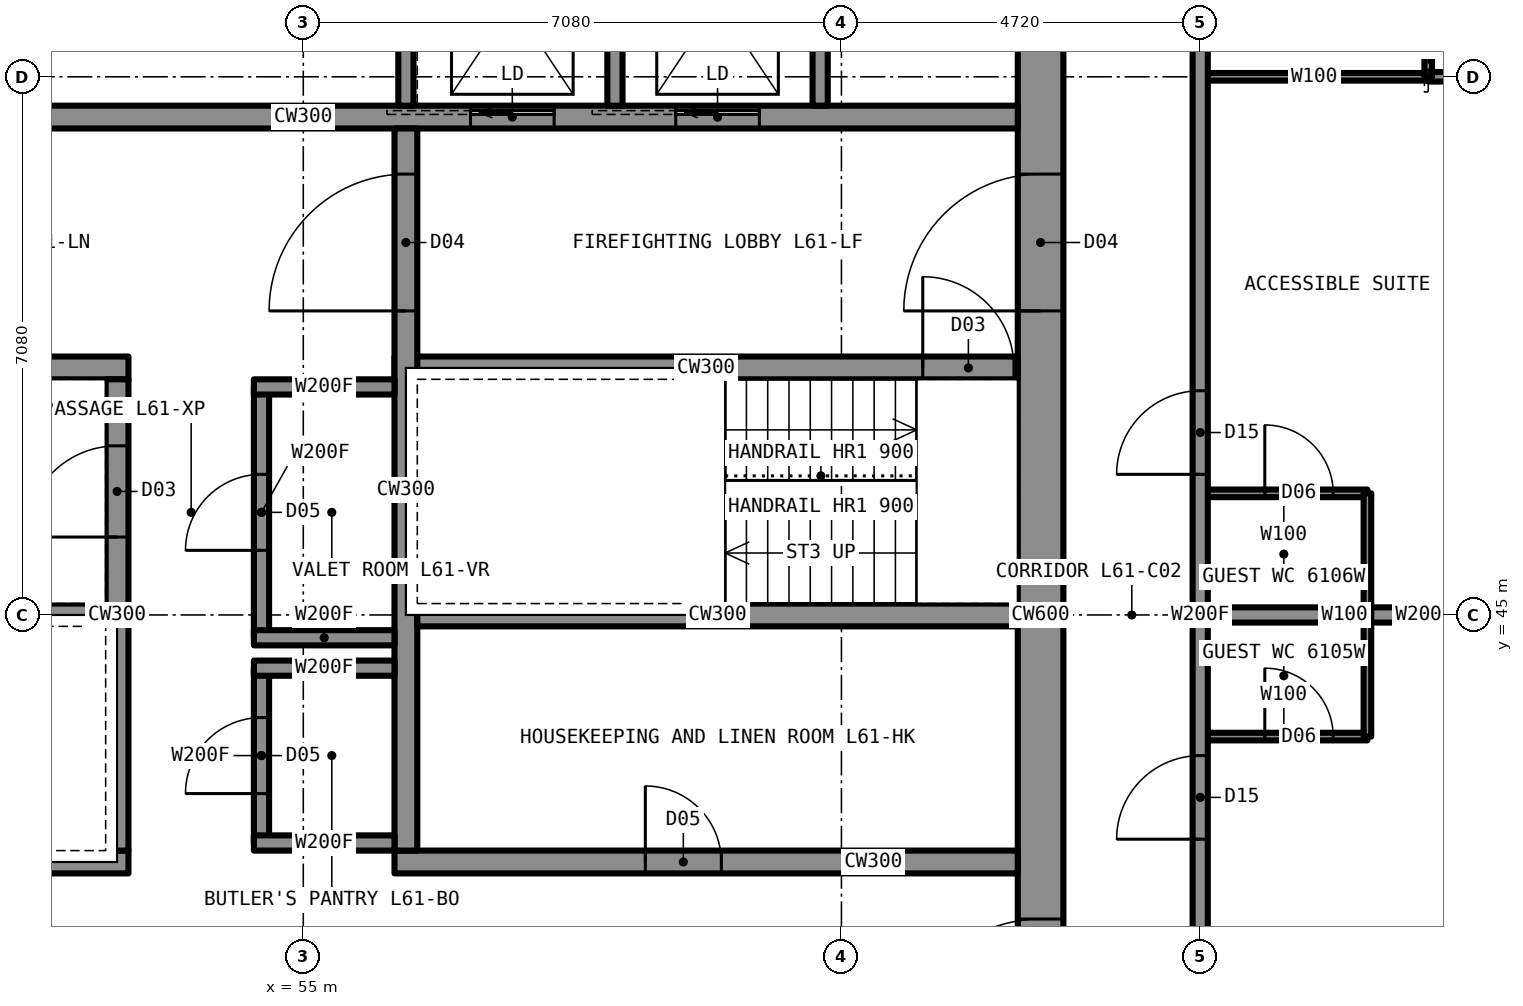
"""IFC4 building model, lengths in metres.
Left out: names, types, materials, properties, quantities, classifications, styles, units other than length and angle.
Written with IfcOpenShell. Run it as: python <this file> out.ifc"""

import sys

from ifc_helpers import new_model, si_unit, direction, frame, frame_2d, origin, place, context, subcontext, project, spatial, rectangle, extrude, element, fill, save


model = new_model("IFC4")
c1 = context("Model", 3, precision=1e-05, world=origin(), true_north=direction((0.0, 1.0)))
c2 = subcontext(c1, "Body", "Model", "MODEL_VIEW")
j1 = project(units=[si_unit("LENGTHUNIT", "METRE"), si_unit("PLANEANGLEUNIT", "RADIAN")], contexts=[c1])
p1 = place(None, origin())
s1 = spatial("IfcSite", under=j1, at=p1, CompositionType="ELEMENT")
p2 = place(p1, origin())
s2 = spatial("IfcBuilding", under=s1, at=p2, CompositionType="ELEMENT")
p3 = place(p2, frame((0.0, 0.0, 226.7)))
s3 = spatial("IfcBuildingStorey", under=s2, at=p3, CompositionType="ELEMENT", Elevation=226.7)
p4 = place(p3, frame((64.7, 35.6, 0.0), z_axis=(0.0, 0.0, 1.0), x_axis=(0.0, 1.0, 0.0)))
e1 = element("IfcWall", 1, at=p4, inside=s3, PredefinedType="SHEAR", context=c2, shape_type="SweptSolid", body=[
    extrude(rectangle(XDim=18.8, YDim=0.6, at=frame_2d((9.4, 0.0))), origin(), (0.0, 0.0, 1.0), 3.5),
])
p5 = place(p4, frame((13.4, 0.0, 0.0)))
e2 = element("IfcOpeningElement", 2, at=p5, cuts=e1, PredefinedType="OPENING", context=c2, shape_type="SweptSolid", body=[
    extrude(rectangle(XDim=1.8, YDim=2.2, at=frame_2d((0.9, 1.1))), frame((0.0, 0.31, 0.0), z_axis=(0.0, -1.0, 0.0), x_axis=(1.0, 0.0, 0.0)), (0.0, 0.0, 1.0), 0.62),
])
p6 = place(p4, frame((3.6, 0.0, 0.0)))
e3 = element("IfcOpeningElement", 3, at=p6, cuts=e1, PredefinedType="OPENING", context=c2, shape_type="SweptSolid", body=[
    extrude(rectangle(XDim=1.8, YDim=2.2, at=frame_2d((0.9, 1.1))), frame((0.0, 0.31, 0.0), z_axis=(0.0, -1.0, 0.0), x_axis=(1.0, 0.0, 0.0)), (0.0, 0.0, 1.0), 0.62),
])
p7 = place(p3, frame((45.6, 51.55, 0.0), z_axis=(0.0, 0.0, 1.0), x_axis=(1.0, 0.0, 0.0)))
e4 = element("IfcWall", 4, at=p7, inside=s3, PredefinedType="SHEAR", context=c2, shape_type="SweptSolid", body=[
    extrude(rectangle(XDim=18.8, YDim=0.3, at=frame_2d((9.4, 0.0))), origin(), (0.0, 0.0, 1.0), 3.5),
])
p8 = place(p7, frame((4.8, 0.0, 0.0)))
e5 = element("IfcOpeningElement", 5, at=p8, cuts=e4, PredefinedType="OPENING", context=c2, shape_type="SweptSolid", body=[
    extrude(rectangle(XDim=1.0, YDim=2.1, at=frame_2d((0.5, 1.05))), frame((0.0, 0.16, 0.0), z_axis=(0.0, -1.0, 0.0), x_axis=(1.0, 0.0, 0.0)), (0.0, 0.0, 1.0), 0.32),
])
p9 = place(p7, frame((11.6, 0.0, 0.0)))
e6 = element("IfcOpeningElement", 6, at=p9, cuts=e4, PredefinedType="OPENING", context=c2, shape_type="SweptSolid", body=[
    extrude(rectangle(XDim=1.1, YDim=2.2, at=frame_2d((0.55, 1.1))), frame((0.0, 0.16, 0.0), z_axis=(0.0, -1.0, 0.0), x_axis=(1.0, 0.0, 0.0)), (0.0, 0.0, 1.0), 0.32),
])
p10 = place(p7, frame((14.3, 0.0, 0.0)))
e7 = element("IfcOpeningElement", 7, at=p10, cuts=e4, PredefinedType="OPENING", context=c2, shape_type="SweptSolid", body=[
    extrude(rectangle(XDim=1.1, YDim=2.2, at=frame_2d((0.55, 1.1))), frame((0.0, 0.16, 0.0), z_axis=(0.0, -1.0, 0.0), x_axis=(1.0, 0.0, 0.0)), (0.0, 0.0, 1.0), 0.32),
])
p11 = place(p3, frame((45.6, 48.25, 0.0), z_axis=(0.0, 0.0, 1.0), x_axis=(1.0, 0.0, 0.0)))
e8 = element("IfcWall", 8, at=p11, inside=s3, PredefinedType="SHEAR", context=c2, shape_type="SweptSolid", body=[
    extrude(rectangle(XDim=7.1, YDim=0.3, at=frame_2d((3.55, 0.0))), origin(), (0.0, 0.0, 1.0), 3.5),
])
p12 = place(p3, frame((56.2, 48.25, 0.0), z_axis=(0.0, 0.0, 1.0), x_axis=(1.0, 0.0, 0.0)))
e9 = element("IfcWall", 9, at=p12, inside=s3, PredefinedType="SHEAR", context=c2, shape_type="SweptSolid", body=[
    extrude(rectangle(XDim=8.2, YDim=0.3, at=frame_2d((4.1, 0.0))), origin(), (0.0, 0.0, 1.0), 3.5),
])
p13 = place(p12, frame((6.95, 0.0, 0.0)))
e10 = element("IfcOpeningElement", 10, at=p13, cuts=e9, PredefinedType="OPENING", context=c2, shape_type="SweptSolid", body=[
    extrude(rectangle(XDim=1.2, YDim=2.2, at=frame_2d((0.6, 1.1))), frame((0.0, 0.16, 0.0), z_axis=(0.0, -1.0, 0.0), x_axis=(1.0, 0.0, 0.0)), (0.0, 0.0, 1.0), 0.32),
])
p14 = place(p3, frame((45.6, 41.75, 0.0), z_axis=(0.0, 0.0, 1.0), x_axis=(1.0, 0.0, 0.0)))
e11 = element("IfcWall", 11, at=p14, inside=s3, PredefinedType="SHEAR", context=c2, shape_type="SweptSolid", body=[
    extrude(rectangle(XDim=7.1, YDim=0.3, at=frame_2d((3.55, 0.0))), origin(), (0.0, 0.0, 1.0), 3.5),
])
p15 = place(p3, frame((56.2, 41.75, 0.0), z_axis=(0.0, 0.0, 1.0), x_axis=(1.0, 0.0, 0.0)))
e12 = element("IfcWall", 12, at=p15, inside=s3, PredefinedType="SHEAR", context=c2, shape_type="SweptSolid", body=[
    extrude(rectangle(XDim=8.2, YDim=0.3, at=frame_2d((4.1, 0.0))), origin(), (0.0, 0.0, 1.0), 3.5),
])
p16 = place(p15, frame((3.3, 0.0, 0.0)))
e13 = element("IfcOpeningElement", 13, at=p16, cuts=e12, PredefinedType="OPENING", context=c2, shape_type="SweptSolid", body=[
    extrude(rectangle(XDim=1.0, YDim=2.1, at=frame_2d((0.5, 1.05))), frame((0.0, 0.16, 0.0), z_axis=(0.0, -1.0, 0.0), x_axis=(1.0, 0.0, 0.0)), (0.0, 0.0, 1.0), 0.32),
])
p17 = place(p3, frame((52.55, 41.9, 0.0), z_axis=(0.0, 0.0, 1.0), x_axis=(0.0, 1.0, 0.0)))
e14 = element("IfcWall", 14, at=p17, inside=s3, PredefinedType="SHEAR", context=c2, shape_type="SweptSolid", body=[
    extrude(rectangle(XDim=6.2, YDim=0.3, at=frame_2d((3.1, 0.0))), origin(), (0.0, 0.0, 1.0), 3.5),
])
p18 = place(p17, frame((4.125, 0.0, 0.0)))
e15 = element("IfcOpeningElement", 15, at=p18, cuts=e14, PredefinedType="OPENING", context=c2, shape_type="SweptSolid", body=[
    extrude(rectangle(XDim=1.2, YDim=2.2, at=frame_2d((0.6, 1.1))), frame((0.0, 0.16, 0.0), z_axis=(0.0, -1.0, 0.0), x_axis=(1.0, 0.0, 0.0)), (0.0, 0.0, 1.0), 0.32),
])
p19 = place(p3, frame((56.35, 41.9, 0.0), z_axis=(0.0, 0.0, 1.0), x_axis=(0.0, 1.0, 0.0)))
e16 = element("IfcWall", 16, at=p19, inside=s3, PredefinedType="SHEAR", context=c2, shape_type="SweptSolid", body=[
    extrude(rectangle(XDim=9.5, YDim=0.3, at=frame_2d((4.75, 0.0))), origin(), (0.0, 0.0, 1.0), 3.5),
])
p20 = place(p19, frame((7.1, 0.0, 0.0)))
e17 = element("IfcOpeningElement", 17, at=p20, cuts=e16, PredefinedType="OPENING", context=c2, shape_type="SweptSolid", body=[
    extrude(rectangle(XDim=1.8, YDim=2.2, at=frame_2d((0.9, 1.1))), frame((0.0, 0.16, 0.0), z_axis=(0.0, -1.0, 0.0), x_axis=(1.0, 0.0, 0.0)), (0.0, 0.0, 1.0), 0.32),
])
p21 = place(p3, frame((45.6, 45.0, 0.0), z_axis=(0.0, 0.0, 1.0), x_axis=(1.0, 0.0, 0.0)))
e18 = element("IfcWall", 18, at=p21, inside=s3, PredefinedType="SHEAR", context=c2, shape_type="SweptSolid", body=[
    extrude(rectangle(XDim=6.8, YDim=0.3, at=frame_2d((3.4, 0.0))), origin(), (0.0, 0.0, 1.0), 3.5),
])
p22 = place(p3, frame((56.5, 45.0, 0.0), z_axis=(0.0, 0.0, 1.0), x_axis=(1.0, 0.0, 0.0)))
e19 = element("IfcWall", 19, at=p22, inside=s3, PredefinedType="SHEAR", context=c2, shape_type="SweptSolid", body=[
    extrude(rectangle(XDim=7.9, YDim=0.3, at=frame_2d((3.95, 0.0))), origin(), (0.0, 0.0, 1.0), 3.5),
])
p23 = place(p3, frame((66.8, 43.4, 0.0), z_axis=(0.0, 0.0, 1.0), x_axis=(1.0, 0.0, 0.0)))
e20 = element("IfcWall", 20, at=p23, inside=s3, PredefinedType="PARTITIONING", context=c2, shape_type="SweptSolid", body=[
    extrude(rectangle(XDim=2.2, YDim=0.1, at=frame_2d((1.1, 0.0))), origin(), (0.0, 0.0, 1.0), 3.33),
])
p24 = place(p23, frame((0.85, 0.0, 0.0)))
e21 = element("IfcOpeningElement", 21, at=p24, cuts=e20, PredefinedType="OPENING", context=c2, shape_type="SweptSolid", body=[
    extrude(rectangle(XDim=0.9, YDim=2.1, at=frame_2d((0.45, 1.05))), frame((0.0, 0.06, 0.0), z_axis=(0.0, -1.0, 0.0), x_axis=(1.0, 0.0, 0.0)), (0.0, 0.0, 1.0), 0.12),
])
p25 = place(p3, frame((66.8, 45.0, 0.0), z_axis=(0.0, 0.0, 1.0), x_axis=(1.0, 0.0, 0.0)))
e22 = element("IfcWall", 22, at=p25, inside=s3, PredefinedType="PARTITIONING", context=c2, shape_type="SweptSolid", body=[
    extrude(rectangle(XDim=5.9, YDim=0.2, at=frame_2d((2.95, 0.0))), origin(), (0.0, 0.0, 1.0), 2.797),
])
p26 = place(p3, frame((66.8, 46.6, 0.0), z_axis=(0.0, 0.0, 1.0), x_axis=(1.0, 0.0, 0.0)))
e23 = element("IfcWall", 23, at=p26, inside=s3, PredefinedType="PARTITIONING", context=c2, shape_type="SweptSolid", body=[
    extrude(rectangle(XDim=2.2, YDim=0.1, at=frame_2d((1.1, 0.0))), origin(), (0.0, 0.0, 1.0), 3.33),
])
p27 = place(p26, frame((0.85, 0.0, 0.0)))
e24 = element("IfcOpeningElement", 24, at=p27, cuts=e23, PredefinedType="OPENING", context=c2, shape_type="SweptSolid", body=[
    extrude(rectangle(XDim=0.9, YDim=2.1, at=frame_2d((0.45, 1.05))), frame((0.0, 0.06, 0.0), z_axis=(0.0, -1.0, 0.0), x_axis=(1.0, 0.0, 0.0)), (0.0, 0.0, 1.0), 0.12),
])
p28 = place(p3, frame((66.8, 52.08, 0.0), z_axis=(0.0, 0.0, 1.0), x_axis=(1.0, 0.0, 0.0)))
e25 = element("IfcWall", 25, at=p28, inside=s3, PredefinedType="PARTITIONING", context=c2, shape_type="SweptSolid", body=[
    extrude(rectangle(XDim=3.0, YDim=0.1, at=frame_2d((1.5, 0.0))), origin(), (0.0, 0.0, 1.0), 2.573),
])
p29 = place(p3, frame((69.8, 52.08, 0.0), z_axis=(0.0, 0.0, 1.0), x_axis=(1.0, 0.0, 0.0)))
e26 = element("IfcWall", 26, at=p29, inside=s3, PredefinedType="PARTITIONING", context=c2, shape_type="SweptSolid", body=[
    extrude(rectangle(XDim=2.9, YDim=0.125, at=frame_2d((1.45, 0.0))), origin(), (0.0, 0.0, 1.0), 2.573),
])
p30 = place(p29, frame((1.05, 0.0, 0.0)))
e27 = element("IfcOpeningElement", 27, at=p30, cuts=e26, PredefinedType="OPENING", context=c2, shape_type="SweptSolid", body=[
    extrude(rectangle(XDim=0.9, YDim=2.2, at=frame_2d((0.45, 1.1))), frame((0.0, 0.073, 0.0), z_axis=(0.0, -1.0, 0.0), x_axis=(1.0, 0.0, 0.0)), (0.0, 0.0, 1.0), 0.145),
])
p31 = place(p3, frame((66.8, 33.2, 0.0), z_axis=(0.0, 0.0, 1.0), x_axis=(0.0, 1.0, 0.0)))
e28 = element("IfcWall", 28, at=p31, inside=s3, PredefinedType="PARTITIONING", context=c2, shape_type="SweptSolid", body=[
    extrude(rectangle(XDim=23.6, YDim=0.2, at=frame_2d((11.8, 0.0))), origin(), (0.0, 0.0, 1.0), 3.33),
])
p32 = place(p31, frame((8.85, 0.0, 0.0)))
e29 = element("IfcOpeningElement", 29, at=p32, cuts=e28, PredefinedType="OPENING", context=c2, shape_type="SweptSolid", body=[
    extrude(rectangle(XDim=1.1, YDim=2.2, at=frame_2d((0.55, 1.1))), frame((0.0, 0.11, 0.0), z_axis=(0.0, -1.0, 0.0), x_axis=(1.0, 0.0, 0.0)), (0.0, 0.0, 1.0), 0.22),
])
p33 = place(p31, frame((13.65, 0.0, 0.0)))
e30 = element("IfcOpeningElement", 30, at=p33, cuts=e28, PredefinedType="OPENING", context=c2, shape_type="SweptSolid", body=[
    extrude(rectangle(XDim=1.1, YDim=2.2, at=frame_2d((0.55, 1.1))), frame((0.0, 0.11, 0.0), z_axis=(0.0, -1.0, 0.0), x_axis=(1.0, 0.0, 0.0)), (0.0, 0.0, 1.0), 0.22),
])
p34 = place(p3, frame((69.0, 43.4, 0.0), z_axis=(0.0, 0.0, 1.0), x_axis=(0.0, 1.0, 0.0)))
e31 = element("IfcWall", 31, at=p34, inside=s3, PredefinedType="PARTITIONING", context=c2, shape_type="SweptSolid", body=[
    extrude(rectangle(XDim=3.2, YDim=0.1, at=frame_2d((1.6, 0.0))), origin(), (0.0, 0.0, 1.0), 3.33),
])
p35 = place(p3, frame((69.8, 52.08, 0.0), z_axis=(0.0, 0.0, 1.0), x_axis=(0.0, 1.0, 0.0)))
e32 = element("IfcWall", 32, at=p35, inside=s3, PredefinedType="PARTITIONING", context=c2, shape_type="SweptSolid", body=[
    extrude(rectangle(XDim=2.9, YDim=0.1, at=frame_2d((1.45, 0.0))), origin(), (0.0, 0.0, 1.0), 3.33),
])
p36 = place(p35, frame((0.9, 0.0, 0.0)))
e33 = element("IfcOpeningElement", 33, at=p36, cuts=e32, PredefinedType="OPENING", context=c2, shape_type="SweptSolid", body=[
    extrude(rectangle(XDim=1.1, YDim=2.1, at=frame_2d((0.55, 1.05))), frame((0.0, 0.06, 0.0), z_axis=(0.0, -1.0, 0.0), x_axis=(1.0, 0.0, 0.0)), (0.0, 0.0, 1.0), 0.12),
])
p37 = place(p3, frame((54.45, 42.0, 0.0), z_axis=(0.0, 0.0, 1.0), x_axis=(0.0, 1.0, 0.0)))
e34 = element("IfcWall", 34, at=p37, inside=s3, PredefinedType="PARTITIONING", context=c2, shape_type="SweptSolid", body=[
    extrude(rectangle(XDim=2.3, YDim=0.2, at=frame_2d((1.15, 0.0))), origin(), (0.0, 0.0, 1.0), 3.33),
])
p38 = place(p37, frame((0.65, 0.0, 0.0)))
e35 = element("IfcOpeningElement", 35, at=p38, cuts=e34, PredefinedType="OPENING", context=c2, shape_type="SweptSolid", body=[
    extrude(rectangle(XDim=1.0, YDim=2.1, at=frame_2d((0.5, 1.05))), frame((0.0, 0.11, 0.0), z_axis=(0.0, -1.0, 0.0), x_axis=(1.0, 0.0, 0.0)), (0.0, 0.0, 1.0), 0.22),
])
for number, where, z_axis, x_axis in (
    (36, (54.35, 42.0, 0.0), (0.0, 0.0, 1.0), (1.0, 0.0, 0.0)),
    (37, (54.35, 44.3, 0.0), (0.0, 0.0, 1.0), (1.0, 0.0, 0.0)),
):
    element("IfcWall", number, at=place(p3, frame(where, z_axis=z_axis, x_axis=x_axis)), inside=s3, PredefinedType="PARTITIONING", context=c2, shape_type="SweptSolid", body=[
        extrude(rectangle(XDim=1.85, YDim=0.2, at=frame_2d((0.925, 0.0))), origin(), (0.0, 0.0, 1.0), 3.33),
    ])
p39 = place(p3, frame((54.45, 44.7, 0.0), z_axis=(0.0, 0.0, 1.0), x_axis=(0.0, 1.0, 0.0)))
e38 = element("IfcWall", 38, at=p39, inside=s3, PredefinedType="PARTITIONING", context=c2, shape_type="SweptSolid", body=[
    extrude(rectangle(XDim=3.3, YDim=0.2, at=frame_2d((1.65, 0.0))), origin(), (0.0, 0.0, 1.0), 3.33),
])
p40 = place(p39, frame((1.15, 0.0, 0.0)))
e39 = element("IfcOpeningElement", 39, at=p40, cuts=e38, PredefinedType="OPENING", context=c2, shape_type="SweptSolid", body=[
    extrude(rectangle(XDim=1.0, YDim=2.1, at=frame_2d((0.5, 1.05))), frame((0.0, 0.11, 0.0), z_axis=(0.0, -1.0, 0.0), x_axis=(1.0, 0.0, 0.0)), (0.0, 0.0, 1.0), 0.22),
])
for number, where, z_axis, x_axis in (
    (40, (54.35, 44.7, 0.0), (0.0, 0.0, 1.0), (1.0, 0.0, 0.0)),
    (41, (54.35, 48.0, 0.0), (0.0, 0.0, 1.0), (1.0, 0.0, 0.0)),
):
    element("IfcWall", number, at=place(p3, frame(where, z_axis=z_axis, x_axis=x_axis)), inside=s3, PredefinedType="PARTITIONING", context=c2, shape_type="SweptSolid", body=[
        extrude(rectangle(XDim=1.85, YDim=0.2, at=frame_2d((0.925, 0.0))), origin(), (0.0, 0.0, 1.0), 3.33),
    ])
for number, where, z_axis, x_axis in (
    (42, (59.1, 51.7, 0.0), (0.0, 0.0, 1.0), (0.0, 1.0, 0.0)),
    (43, (61.8, 51.7, 0.0), (0.0, 0.0, 1.0), (0.0, 1.0, 0.0)),
    (44, (56.35, 51.7, 0.0), (0.0, 0.0, 1.0), (0.0, 1.0, 0.0)),
):
    element("IfcWall", number, at=place(p3, frame(where, z_axis=z_axis, x_axis=x_axis)), inside=s3, PredefinedType="PARTITIONING", context=c2, shape_type="SweptSolid", body=[
        extrude(rectangle(XDim=2.7, YDim=0.2, at=frame_2d((1.35, 0.0))), origin(), (0.0, 0.0, 1.0), 3.33),
    ])
p41 = place(p32, origin())
e45 = element("IfcDoor", 45, at=p41, inside=s3, OperationType="SINGLE_SWING_LEFT", PredefinedType="DOOR", context=c2, shape_type="SweptSolid", body=[
    extrude(rectangle(XDim=1.1, YDim=2.2, at=frame_2d((0.55, 1.1))), frame((0.0, 0.025, 0.0), z_axis=(0.0, -1.0, 0.0), x_axis=(1.0, 0.0, 0.0)), (0.0, 0.0, 1.0), 0.05),
])
fill(e29, e45)
p42 = place(p24, origin())
e46 = element("IfcDoor", 46, at=p42, inside=s3, OperationType="SINGLE_SWING_LEFT", PredefinedType="DOOR", context=c2, shape_type="SweptSolid", body=[
    extrude(rectangle(XDim=0.9, YDim=2.1, at=frame_2d((0.45, 1.05))), frame((0.0, 0.025, 0.0), z_axis=(0.0, -1.0, 0.0), x_axis=(1.0, 0.0, 0.0)), (0.0, 0.0, 1.0), 0.05),
])
fill(e21, e46)
p43 = place(p33, origin())
e47 = element("IfcDoor", 47, at=p43, inside=s3, OperationType="SINGLE_SWING_LEFT", PredefinedType="DOOR", context=c2, shape_type="SweptSolid", body=[
    extrude(rectangle(XDim=1.1, YDim=2.2, at=frame_2d((0.55, 1.1))), frame((0.0, 0.025, 0.0), z_axis=(0.0, -1.0, 0.0), x_axis=(1.0, 0.0, 0.0)), (0.0, 0.0, 1.0), 0.05),
])
fill(e30, e47)
p44 = place(p27, origin())
e48 = element("IfcDoor", 48, at=p44, inside=s3, OperationType="SINGLE_SWING_LEFT", PredefinedType="DOOR", context=c2, shape_type="SweptSolid", body=[
    extrude(rectangle(XDim=0.9, YDim=2.1, at=frame_2d((0.45, 1.05))), frame((0.0, 0.025, 0.0), z_axis=(0.0, -1.0, 0.0), x_axis=(1.0, 0.0, 0.0)), (0.0, 0.0, 1.0), 0.05),
])
fill(e24, e48)
p45 = place(p38, origin())
e49 = element("IfcDoor", 49, at=p45, inside=s3, OperationType="SINGLE_SWING_LEFT", PredefinedType="DOOR", context=c2, shape_type="SweptSolid", body=[
    extrude(rectangle(XDim=1.0, YDim=2.1, at=frame_2d((0.5, 1.05))), frame((0.0, 0.025, 0.0), z_axis=(0.0, -1.0, 0.0), x_axis=(1.0, 0.0, 0.0)), (0.0, 0.0, 1.0), 0.05),
])
fill(e35, e49)
p46 = place(p40, origin())
e50 = element("IfcDoor", 50, at=p46, inside=s3, OperationType="SINGLE_SWING_LEFT", PredefinedType="DOOR", context=c2, shape_type="SweptSolid", body=[
    extrude(rectangle(XDim=1.0, YDim=2.1, at=frame_2d((0.5, 1.05))), frame((0.0, 0.025, 0.0), z_axis=(0.0, -1.0, 0.0), x_axis=(1.0, 0.0, 0.0)), (0.0, 0.0, 1.0), 0.05),
])
fill(e39, e50)
p47 = place(p5, origin())
e51 = element("IfcDoor", 51, at=p47, inside=s3, OperationType="DOUBLE_DOOR_SINGLE_SWING", PredefinedType="DOOR", context=c2, shape_type="SweptSolid", body=[
    extrude(rectangle(XDim=1.8, YDim=2.2, at=frame_2d((0.9, 1.1))), frame((0.0, 0.025, 0.0), z_axis=(0.0, -1.0, 0.0), x_axis=(1.0, 0.0, 0.0)), (0.0, 0.0, 1.0), 0.05),
])
fill(e2, e51)
p48 = place(p6, origin())
e52 = element("IfcDoor", 52, at=p48, inside=s3, OperationType="DOUBLE_DOOR_SINGLE_SWING", PredefinedType="DOOR", context=c2, shape_type="SweptSolid", body=[
    extrude(rectangle(XDim=1.8, YDim=2.2, at=frame_2d((0.9, 1.1))), frame((0.0, 0.025, 0.0), z_axis=(0.0, -1.0, 0.0), x_axis=(1.0, 0.0, 0.0)), (0.0, 0.0, 1.0), 0.05),
])
fill(e3, e52)
p49 = place(p20, origin())
e53 = element("IfcDoor", 53, at=p49, inside=s3, OperationType="DOUBLE_DOOR_SINGLE_SWING", PredefinedType="DOOR", context=c2, shape_type="SweptSolid", body=[
    extrude(rectangle(XDim=1.8, YDim=2.2, at=frame_2d((0.9, 1.1))), frame((0.0, 0.025, 0.0), z_axis=(0.0, -1.0, 0.0), x_axis=(1.0, 0.0, 0.0)), (0.0, 0.0, 1.0), 0.05),
])
fill(e17, e53)
p50 = place(p18, origin())
e54 = element("IfcDoor", 54, at=p50, inside=s3, OperationType="SINGLE_SWING_LEFT", PredefinedType="DOOR", context=c2, shape_type="SweptSolid", body=[
    extrude(rectangle(XDim=1.2, YDim=2.2, at=frame_2d((0.6, 1.1))), frame((0.0, 0.025, 0.0), z_axis=(0.0, -1.0, 0.0), x_axis=(1.0, 0.0, 0.0)), (0.0, 0.0, 1.0), 0.05),
])
fill(e15, e54)
p51 = place(p13, origin())
e55 = element("IfcDoor", 55, at=p51, inside=s3, OperationType="SINGLE_SWING_LEFT", PredefinedType="DOOR", context=c2, shape_type="SweptSolid", body=[
    extrude(rectangle(XDim=1.2, YDim=2.2, at=frame_2d((0.6, 1.1))), frame((0.0, 0.025, 0.0), z_axis=(0.0, -1.0, 0.0), x_axis=(1.0, 0.0, 0.0)), (0.0, 0.0, 1.0), 0.05),
])
fill(e10, e55)
p52 = place(p16, origin())
e56 = element("IfcDoor", 56, at=p52, inside=s3, OperationType="SINGLE_SWING_LEFT", PredefinedType="DOOR", context=c2, shape_type="SweptSolid", body=[
    extrude(rectangle(XDim=1.0, YDim=2.1, at=frame_2d((0.5, 1.05))), frame((0.0, 0.025, 0.0), z_axis=(0.0, -1.0, 0.0), x_axis=(1.0, 0.0, 0.0)), (0.0, 0.0, 1.0), 0.05),
])
fill(e13, e56)
p53 = place(p9, origin())
e57 = element("IfcDoor", 57, at=p53, inside=s3, OperationType="SLIDING_TO_LEFT", PredefinedType="DOOR", context=c2, shape_type="SweptSolid", body=[
    extrude(rectangle(XDim=1.1, YDim=2.2, at=frame_2d((0.55, 1.1))), frame((0.0, 0.025, 0.0), z_axis=(0.0, -1.0, 0.0), x_axis=(1.0, 0.0, 0.0)), (0.0, 0.0, 1.0), 0.05),
])
fill(e6, e57)
p54 = place(p10, origin())
e58 = element("IfcDoor", 58, at=p54, inside=s3, OperationType="SLIDING_TO_LEFT", PredefinedType="DOOR", context=c2, shape_type="SweptSolid", body=[
    extrude(rectangle(XDim=1.1, YDim=2.2, at=frame_2d((0.55, 1.1))), frame((0.0, 0.025, 0.0), z_axis=(0.0, -1.0, 0.0), x_axis=(1.0, 0.0, 0.0)), (0.0, 0.0, 1.0), 0.05),
])
fill(e7, e58)
save(model, sys.argv[1])
